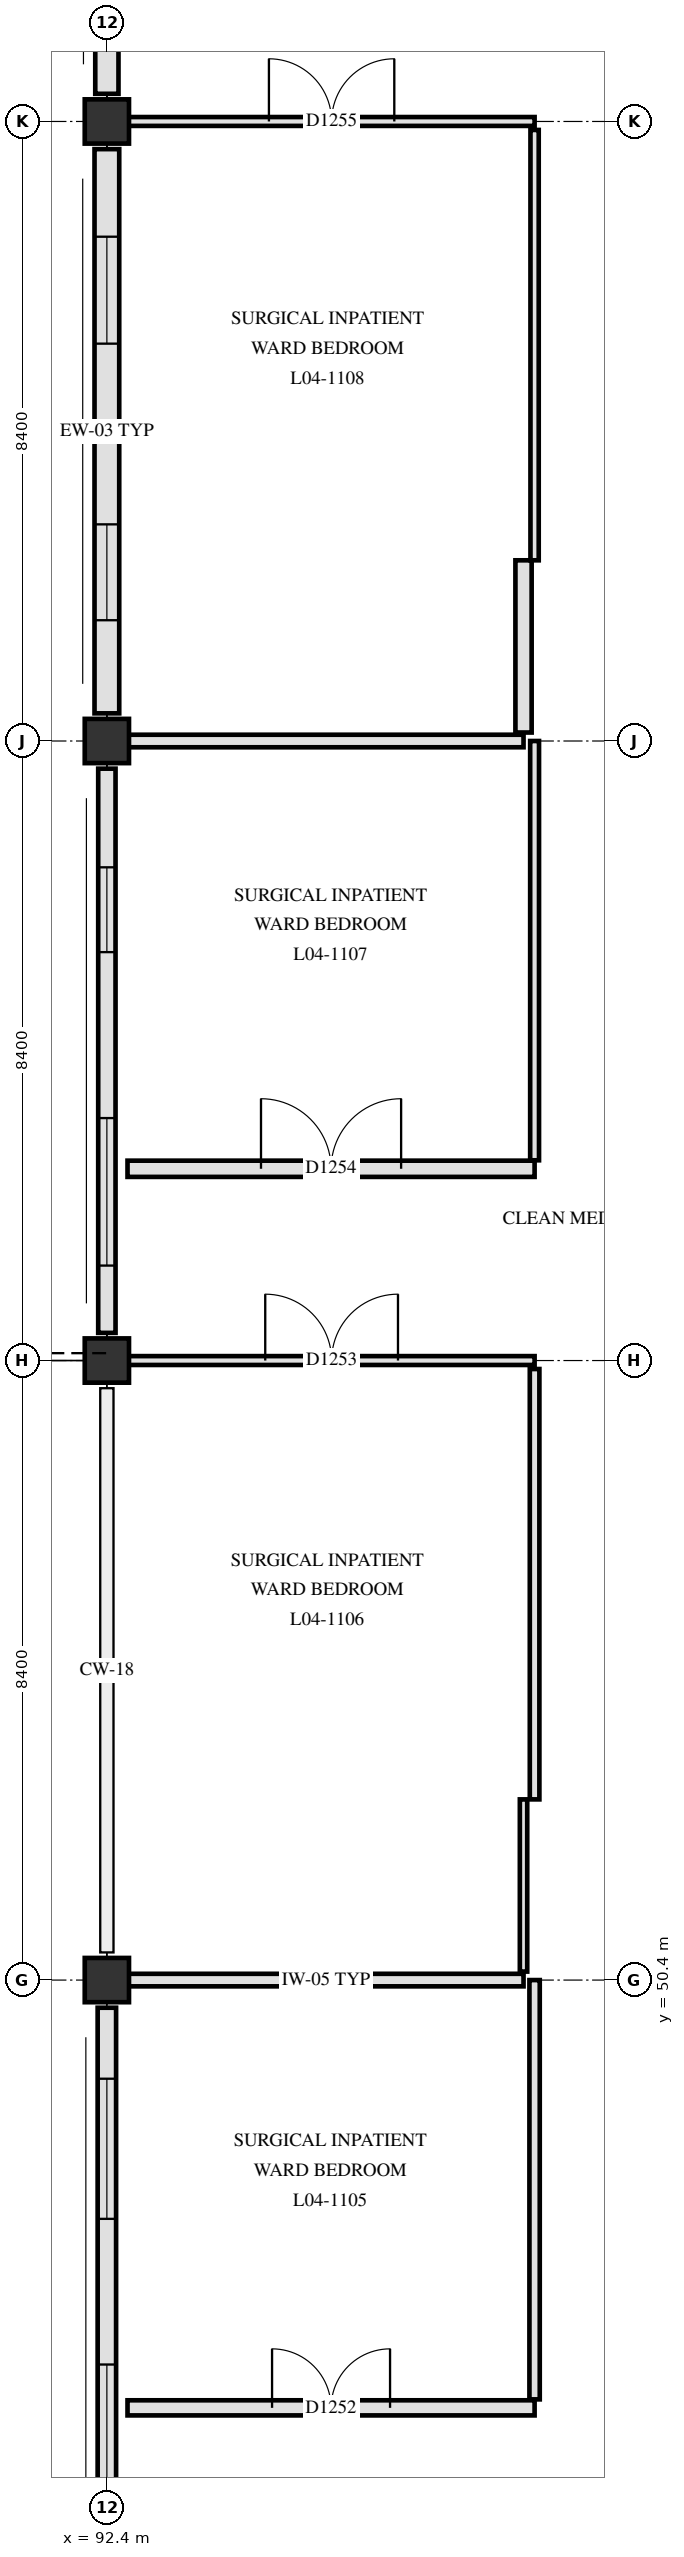
"""IFC4 building model, lengths in metres.
Left out: names, types, materials, properties, quantities, classifications, styles, units other than length and angle.
Written with IfcOpenShell. Run it as: python <this file> out.ifc"""

import sys

from ifc_helpers import new_model, si_unit, direction, frame, frame_2d, origin, origin_2d, place, context, subcontext, project, spatial, rectangle, extrude, element, fill, save


model = new_model("IFC4")
c1 = context("Model", 3, precision=1e-05, world=origin(), true_north=direction((0.0, 1.0)))
c2 = subcontext(c1, "Body", "Model", "MODEL_VIEW")
j1 = project(units=[si_unit("LENGTHUNIT", "METRE"), si_unit("PLANEANGLEUNIT", "RADIAN")], contexts=[c1])
p1 = place(None, origin())
s1 = spatial("IfcSite", under=j1, at=p1, CompositionType="ELEMENT")
p2 = place(p1, origin())
s2 = spatial("IfcBuilding", under=s1, at=p2, CompositionType="ELEMENT")
p3 = place(p2, frame((0.0, 0.0, 18.6)))
s3 = spatial("IfcBuildingStorey", under=s2, at=p3, CompositionType="ELEMENT", Elevation=18.6)
for number, where, z_axis, x_axis in (
    (1, (92.4, 50.4, 0.0), (0.0, 0.0, 1.0), (1.0, 0.0, 0.0)),
    (2, (92.4, 58.8, 0.0), (0.0, 0.0, 1.0), (1.0, 0.0, 0.0)),
    (3, (92.4, 67.2, 0.0), (0.0, 0.0, 1.0), (1.0, 0.0, 0.0)),
    (4, (92.4, 75.6, 0.0), (0.0, 0.0, 1.0), (1.0, 0.0, 0.0)),
):
    element("IfcColumn", number, at=place(p3, frame(where, z_axis=z_axis, x_axis=x_axis)), inside=s3, PredefinedType="COLUMN", context=c2, shape_type="SweptSolid", body=[
        extrude(rectangle(XDim=0.6, YDim=0.6, at=origin_2d()), origin(), (0.0, 0.0, 1.0), 3.9),
    ])
p4 = place(p3, frame((92.4, 42.375, 0.0), z_axis=(0.0, 0.0, 1.0), x_axis=(0.0, 1.0, 0.0)))
e5 = element("IfcWall", 5, at=p4, inside=s3, PredefinedType="SOLIDWALL", context=c2, shape_type="SweptSolid", body=[
    extrude(rectangle(XDim=7.65, YDim=0.25, at=frame_2d((3.825, 0.0))), origin(), (0.0, 0.0, 1.0), 3.38),
])
p5 = place(p4, frame((1.012, 0.0, 0.85)))
e6 = element("IfcOpeningElement", 6, at=p5, cuts=e5, PredefinedType="OPENING", context=c2, shape_type="SweptSolid", body=[
    extrude(rectangle(XDim=1.8, YDim=1.66, at=frame_2d((0.9, 0.83))), frame((0.0, 0.135, 0.0), z_axis=(0.0, -1.0, 0.0), x_axis=(1.0, 0.0, 0.0)), (0.0, 0.0, 1.0), 0.27),
])
p6 = place(p4, frame((4.788, 0.0, 0.85)))
e7 = element("IfcOpeningElement", 7, at=p6, cuts=e5, PredefinedType="OPENING", context=c2, shape_type="SweptSolid", body=[
    extrude(rectangle(XDim=1.9, YDim=1.66, at=frame_2d((0.95, 0.83))), frame((0.0, 0.135, 0.0), z_axis=(0.0, -1.0, 0.0), x_axis=(1.0, 0.0, 0.0)), (0.0, 0.0, 1.0), 0.27),
])
p7 = place(p3, frame((92.4, 59.175, 0.0), z_axis=(0.0, 0.0, 1.0), x_axis=(0.0, 1.0, 0.0)))
e8 = element("IfcWall", 8, at=p7, inside=s3, PredefinedType="SOLIDWALL", context=c2, shape_type="SweptSolid", body=[
    extrude(rectangle(XDim=7.65, YDim=0.235, at=frame_2d((3.825, 0.0))), origin(), (0.0, 0.0, 1.0), 3.38),
])
p8 = place(p7, frame((0.913, 0.0, 0.85)))
e9 = element("IfcOpeningElement", 9, at=p8, cuts=e8, PredefinedType="OPENING", context=c2, shape_type="SweptSolid", body=[
    extrude(rectangle(XDim=2.0, YDim=1.66, at=frame_2d((1.0, 0.83))), frame((0.0, 0.127, 0.0), z_axis=(0.0, -1.0, 0.0), x_axis=(1.0, 0.0, 0.0)), (0.0, 0.0, 1.0), 0.255),
])
p9 = place(p7, frame((5.163, 0.0, 0.85)))
e10 = element("IfcOpeningElement", 10, at=p9, cuts=e8, PredefinedType="OPENING", context=c2, shape_type="SweptSolid", body=[
    extrude(rectangle(XDim=1.15, YDim=1.78, at=frame_2d((0.575, 0.89))), frame((0.0, 0.127, 0.0), z_axis=(0.0, -1.0, 0.0), x_axis=(1.0, 0.0, 0.0)), (0.0, 0.0, 1.0), 0.255),
])
p10 = place(p3, frame((92.4, 67.575, 0.0), z_axis=(0.0, 0.0, 1.0), x_axis=(0.0, 1.0, 0.0)))
e11 = element("IfcWall", 11, at=p10, inside=s3, PredefinedType="SOLIDWALL", context=c2, shape_type="SweptSolid", body=[
    extrude(rectangle(XDim=7.65, YDim=0.335, at=frame_2d((3.825, 0.0))), origin(), (0.0, 0.0, 1.0), 3.31),
])
p11 = place(p10, frame((1.262, 0.0, 0.85)))
e12 = element("IfcOpeningElement", 12, at=p11, cuts=e11, PredefinedType="OPENING", context=c2, shape_type="SweptSolid", body=[
    extrude(rectangle(XDim=1.3, YDim=1.78, at=frame_2d((0.65, 0.89))), frame((0.0, 0.177, 0.0), z_axis=(0.0, -1.0, 0.0), x_axis=(1.0, 0.0, 0.0)), (0.0, 0.0, 1.0), 0.355),
])
p12 = place(p10, frame((5.012, 0.0, 0.85)))
e13 = element("IfcOpeningElement", 13, at=p12, cuts=e11, PredefinedType="OPENING", context=c2, shape_type="SweptSolid", body=[
    extrude(rectangle(XDim=1.45, YDim=1.78, at=frame_2d((0.725, 0.89))), frame((0.0, 0.177, 0.0), z_axis=(0.0, -1.0, 0.0), x_axis=(1.0, 0.0, 0.0)), (0.0, 0.0, 1.0), 0.355),
])
p13 = place(p3, frame((92.4, 75.975, 0.0), z_axis=(0.0, 0.0, 1.0), x_axis=(0.0, 1.0, 0.0)))
e14 = element("IfcWall", 14, at=p13, inside=s3, PredefinedType="SOLIDWALL", context=c2, shape_type="SweptSolid", body=[
    extrude(rectangle(XDim=7.65, YDim=0.315, at=frame_2d((3.825, 0.0))), origin(), (0.0, 0.0, 1.0), 3.31),
])
p14 = place(p13, frame((1.113, 0.0, 0.85)))
e15 = element("IfcOpeningElement", 15, at=p14, cuts=e14, PredefinedType="OPENING", context=c2, shape_type="SweptSolid", body=[
    extrude(rectangle(XDim=1.6, YDim=1.78, at=frame_2d((0.8, 0.89))), frame((0.0, 0.167, 0.0), z_axis=(0.0, -1.0, 0.0), x_axis=(1.0, 0.0, 0.0)), (0.0, 0.0, 1.0), 0.335),
])
p15 = place(p13, frame((4.863, 0.0, 0.85)))
e16 = element("IfcOpeningElement", 16, at=p15, cuts=e14, PredefinedType="OPENING", context=c2, shape_type="SweptSolid", body=[
    extrude(rectangle(XDim=1.75, YDim=1.78, at=frame_2d((0.875, 0.89))), frame((0.0, 0.167, 0.0), z_axis=(0.0, -1.0, 0.0), x_axis=(1.0, 0.0, 0.0)), (0.0, 0.0, 1.0), 0.335),
])
p16 = place(p3, frame((92.68, 44.6, 0.0), z_axis=(0.0, 0.0, 1.0), x_axis=(1.0, 0.0, 0.0)))
e17 = element("IfcWall", 17, at=p16, inside=s3, PredefinedType="PARTITIONING", context=c2, shape_type="SweptSolid", body=[
    extrude(rectangle(XDim=5.52, YDim=0.205, at=frame_2d((2.76, 0.0))), origin(), (0.0, 0.0, 1.0), 3.31),
])
p17 = place(p16, frame((1.96, 0.0, 0.0)))
e18 = element("IfcOpeningElement", 18, at=p17, cuts=e17, PredefinedType="OPENING", context=c2, shape_type="SweptSolid", body=[
    extrude(rectangle(XDim=1.6, YDim=2.25, at=frame_2d((0.8, 1.125))), frame((0.0, 0.113, 0.0), z_axis=(0.0, -1.0, 0.0), x_axis=(1.0, 0.0, 0.0)), (0.0, 0.0, 1.0), 0.225),
])
p18 = place(p3, frame((92.695, 50.4, 0.0), z_axis=(0.0, 0.0, 1.0), x_axis=(1.0, 0.0, 0.0)))
e19 = element("IfcWall", 19, at=p18, inside=s3, PredefinedType="PARTITIONING", context=c2, shape_type="SweptSolid", body=[
    extrude(rectangle(XDim=5.355, YDim=0.17, at=frame_2d((2.677, 0.0))), origin(), (0.0, 0.0, 1.0), 3.16),
])
p19 = place(p3, frame((92.695, 58.8, 0.0), z_axis=(0.0, 0.0, 1.0), x_axis=(1.0, 0.0, 0.0)))
e20 = element("IfcWall", 20, at=p19, inside=s3, PredefinedType="PARTITIONING", context=c2, shape_type="SweptSolid", body=[
    extrude(rectangle(XDim=5.505, YDim=0.12, at=frame_2d((2.752, 0.0))), origin(), (0.0, 0.0, 1.0), 3.16),
])
p20 = place(p19, frame((1.853, 0.0, 0.0)))
e21 = element("IfcOpeningElement", 21, at=p20, cuts=e20, PredefinedType="OPENING", context=c2, shape_type="SweptSolid", body=[
    extrude(rectangle(XDim=1.8, YDim=2.25, at=frame_2d((0.9, 1.125))), frame((0.0, 0.07, 0.0), z_axis=(0.0, -1.0, 0.0), x_axis=(1.0, 0.0, 0.0)), (0.0, 0.0, 1.0), 0.14),
])
p21 = place(p3, frame((92.68, 61.4, 0.0), z_axis=(0.0, 0.0, 1.0), x_axis=(1.0, 0.0, 0.0)))
e22 = element("IfcWall", 22, at=p21, inside=s3, PredefinedType="PARTITIONING", context=c2, shape_type="SweptSolid", body=[
    extrude(rectangle(XDim=5.52, YDim=0.22, at=frame_2d((2.76, 0.0))), origin(), (0.0, 0.0, 1.0), 3.31),
])
p22 = place(p21, frame((1.81, 0.0, 0.0)))
e23 = element("IfcOpeningElement", 23, at=p22, cuts=e22, PredefinedType="OPENING", context=c2, shape_type="SweptSolid", body=[
    extrude(rectangle(XDim=1.9, YDim=2.3, at=frame_2d((0.95, 1.15))), frame((0.0, 0.12, 0.0), z_axis=(0.0, -1.0, 0.0), x_axis=(1.0, 0.0, 0.0)), (0.0, 0.0, 1.0), 0.24),
])
p23 = place(p3, frame((92.695, 67.2, 0.0), z_axis=(0.0, 0.0, 1.0), x_axis=(1.0, 0.0, 0.0)))
e24 = element("IfcWall", 24, at=p23, inside=s3, PredefinedType="PARTITIONING", context=c2, shape_type="SweptSolid", body=[
    extrude(rectangle(XDim=5.355, YDim=0.17, at=frame_2d((2.677, 0.0))), origin(), (0.0, 0.0, 1.0), 3.16),
])
p24 = place(p3, frame((92.695, 75.6, 0.0), z_axis=(0.0, 0.0, 1.0), x_axis=(1.0, 0.0, 0.0)))
e25 = element("IfcWall", 25, at=p24, inside=s3, PredefinedType="PARTITIONING", context=c2, shape_type="SweptSolid", body=[
    extrude(rectangle(XDim=5.505, YDim=0.12, at=frame_2d((2.752, 0.0))), origin(), (0.0, 0.0, 1.0), 3.16),
])
p25 = place(p24, frame((1.903, 0.0, 0.0)))
e26 = element("IfcOpeningElement", 26, at=p25, cuts=e25, PredefinedType="OPENING", context=c2, shape_type="SweptSolid", body=[
    extrude(rectangle(XDim=1.7, YDim=2.25, at=frame_2d((0.85, 1.125))), frame((0.0, 0.07, 0.0), z_axis=(0.0, -1.0, 0.0), x_axis=(1.0, 0.0, 0.0)), (0.0, 0.0, 1.0), 0.14),
])
p26 = place(p3, frame((98.05, 50.515, 0.0), z_axis=(0.0, 0.0, 1.0), x_axis=(0.0, 1.0, 0.0)))
e27 = element("IfcWall", 27, at=p26, inside=s3, PredefinedType="PARTITIONING", context=c2, shape_type="SweptSolid", body=[
    extrude(rectangle(XDim=2.335, YDim=0.1, at=frame_2d((1.167, 0.0))), origin(), (0.0, 0.0, 1.0), 3.61),
])
p27 = place(p3, frame((98.05, 67.315, 0.0), z_axis=(0.0, 0.0, 1.0), x_axis=(0.0, 1.0, 0.0)))
e28 = element("IfcWall", 28, at=p27, inside=s3, PredefinedType="PARTITIONING", context=c2, shape_type="SweptSolid", body=[
    extrude(rectangle(XDim=2.335, YDim=0.22, at=frame_2d((1.167, 0.0))), origin(), (0.0, 0.0, 1.0), 3.61),
])
p28 = place(p3, frame((98.2, 44.715, 0.0), z_axis=(0.0, 0.0, 1.0), x_axis=(0.0, 1.0, 0.0)))
e29 = element("IfcWall", 29, at=p28, inside=s3, PredefinedType="PARTITIONING", context=c2, shape_type="SweptSolid", body=[
    extrude(rectangle(XDim=5.685, YDim=0.14, at=frame_2d((2.842, 0.0))), origin(), (0.0, 0.0, 1.0), 3.16),
])
p29 = place(p3, frame((98.2, 52.85, 0.0), z_axis=(0.0, 0.0, 1.0), x_axis=(0.0, 1.0, 0.0)))
e30 = element("IfcWall", 30, at=p29, inside=s3, PredefinedType="PARTITIONING", context=c2, shape_type="SweptSolid", body=[
    extrude(rectangle(XDim=5.835, YDim=0.13, at=frame_2d((2.917, 0.0))), origin(), (0.0, 0.0, 1.0), 3.31),
])
p30 = place(p3, frame((98.2, 61.515, 0.0), z_axis=(0.0, 0.0, 1.0), x_axis=(0.0, 1.0, 0.0)))
e31 = element("IfcWall", 31, at=p30, inside=s3, PredefinedType="PARTITIONING", context=c2, shape_type="SweptSolid", body=[
    extrude(rectangle(XDim=5.685, YDim=0.12, at=frame_2d((2.843, 0.0))), origin(), (0.0, 0.0, 1.0), 3.16),
])
p31 = place(p3, frame((98.2, 69.65, 0.0), z_axis=(0.0, 0.0, 1.0), x_axis=(0.0, 1.0, 0.0)))
e32 = element("IfcWall", 32, at=p31, inside=s3, PredefinedType="PARTITIONING", context=c2, shape_type="SweptSolid", body=[
    extrude(rectangle(XDim=5.835, YDim=0.112, at=frame_2d((2.917, 0.0))), origin(), (0.0, 0.0, 1.0), 3.31),
])
p32 = place(p5, origin())
e33 = element("IfcWindow", 33, at=p32, inside=s3, PartitioningType="SINGLE_PANEL", PredefinedType="WINDOW", context=c2, shape_type="SweptSolid", body=[
    extrude(rectangle(XDim=1.8, YDim=1.66, at=frame_2d((0.9, 0.83))), frame((0.0, 0.03, 0.0), z_axis=(0.0, -1.0, 0.0), x_axis=(1.0, 0.0, 0.0)), (0.0, 0.0, 1.0), 0.06),
])
fill(e6, e33)
p33 = place(p6, origin())
e34 = element("IfcWindow", 34, at=p33, inside=s3, PartitioningType="SINGLE_PANEL", PredefinedType="WINDOW", context=c2, shape_type="SweptSolid", body=[
    extrude(rectangle(XDim=1.9, YDim=1.66, at=frame_2d((0.95, 0.83))), frame((0.0, 0.03, 0.0), z_axis=(0.0, -1.0, 0.0), x_axis=(1.0, 0.0, 0.0)), (0.0, 0.0, 1.0), 0.06),
])
fill(e7, e34)
p34 = place(p8, origin())
e35 = element("IfcWindow", 35, at=p34, inside=s3, PartitioningType="SINGLE_PANEL", PredefinedType="WINDOW", context=c2, shape_type="SweptSolid", body=[
    extrude(rectangle(XDim=2.0, YDim=1.66, at=frame_2d((1.0, 0.83))), frame((0.0, 0.03, 0.0), z_axis=(0.0, -1.0, 0.0), x_axis=(1.0, 0.0, 0.0)), (0.0, 0.0, 1.0), 0.06),
])
fill(e9, e35)
p35 = place(p9, origin())
e36 = element("IfcWindow", 36, at=p35, inside=s3, PartitioningType="SINGLE_PANEL", PredefinedType="WINDOW", context=c2, shape_type="SweptSolid", body=[
    extrude(rectangle(XDim=1.15, YDim=1.78, at=frame_2d((0.575, 0.89))), frame((0.0, 0.03, 0.0), z_axis=(0.0, -1.0, 0.0), x_axis=(1.0, 0.0, 0.0)), (0.0, 0.0, 1.0), 0.06),
])
fill(e10, e36)
p36 = place(p11, origin())
e37 = element("IfcWindow", 37, at=p36, inside=s3, PartitioningType="SINGLE_PANEL", PredefinedType="WINDOW", context=c2, shape_type="SweptSolid", body=[
    extrude(rectangle(XDim=1.3, YDim=1.78, at=frame_2d((0.65, 0.89))), frame((0.0, 0.03, 0.0), z_axis=(0.0, -1.0, 0.0), x_axis=(1.0, 0.0, 0.0)), (0.0, 0.0, 1.0), 0.06),
])
fill(e12, e37)
p37 = place(p12, origin())
e38 = element("IfcWindow", 38, at=p37, inside=s3, PartitioningType="SINGLE_PANEL", PredefinedType="WINDOW", context=c2, shape_type="SweptSolid", body=[
    extrude(rectangle(XDim=1.45, YDim=1.78, at=frame_2d((0.725, 0.89))), frame((0.0, 0.03, 0.0), z_axis=(0.0, -1.0, 0.0), x_axis=(1.0, 0.0, 0.0)), (0.0, 0.0, 1.0), 0.06),
])
fill(e13, e38)
p38 = place(p17, origin())
e39 = element("IfcDoor", 39, at=p38, inside=s3, OperationType="DOUBLE_SWING_LEFT", PredefinedType="DOOR", context=c2, shape_type="SweptSolid", body=[
    extrude(rectangle(XDim=1.6, YDim=2.25, at=frame_2d((0.8, 1.125))), frame((0.0, 0.025, 0.0), z_axis=(0.0, -1.0, 0.0), x_axis=(1.0, 0.0, 0.0)), (0.0, 0.0, 1.0), 0.05),
])
fill(e18, e39)
p39 = place(p20, origin())
e40 = element("IfcDoor", 40, at=p39, inside=s3, OperationType="DOUBLE_SWING_RIGHT", PredefinedType="DOOR", context=c2, shape_type="SweptSolid", body=[
    extrude(rectangle(XDim=1.8, YDim=2.25, at=frame_2d((0.9, 1.125))), frame((0.0, 0.025, 0.0), z_axis=(0.0, -1.0, 0.0), x_axis=(1.0, 0.0, 0.0)), (0.0, 0.0, 1.0), 0.05),
])
fill(e21, e40)
p40 = place(p22, origin())
e41 = element("IfcDoor", 41, at=p40, inside=s3, OperationType="DOUBLE_SWING_LEFT", PredefinedType="DOOR", context=c2, shape_type="SweptSolid", body=[
    extrude(rectangle(XDim=1.9, YDim=2.3, at=frame_2d((0.95, 1.15))), frame((0.0, 0.025, 0.0), z_axis=(0.0, -1.0, 0.0), x_axis=(1.0, 0.0, 0.0)), (0.0, 0.0, 1.0), 0.05),
])
fill(e23, e41)
p41 = place(p25, origin())
e42 = element("IfcDoor", 42, at=p41, inside=s3, OperationType="DOUBLE_SWING_RIGHT", PredefinedType="DOOR", context=c2, shape_type="SweptSolid", body=[
    extrude(rectangle(XDim=1.7, YDim=2.25, at=frame_2d((0.85, 1.125))), frame((0.0, 0.025, 0.0), z_axis=(0.0, -1.0, 0.0), x_axis=(1.0, 0.0, 0.0)), (0.0, 0.0, 1.0), 0.05),
])
fill(e26, e42)
save(model, sys.argv[1])
